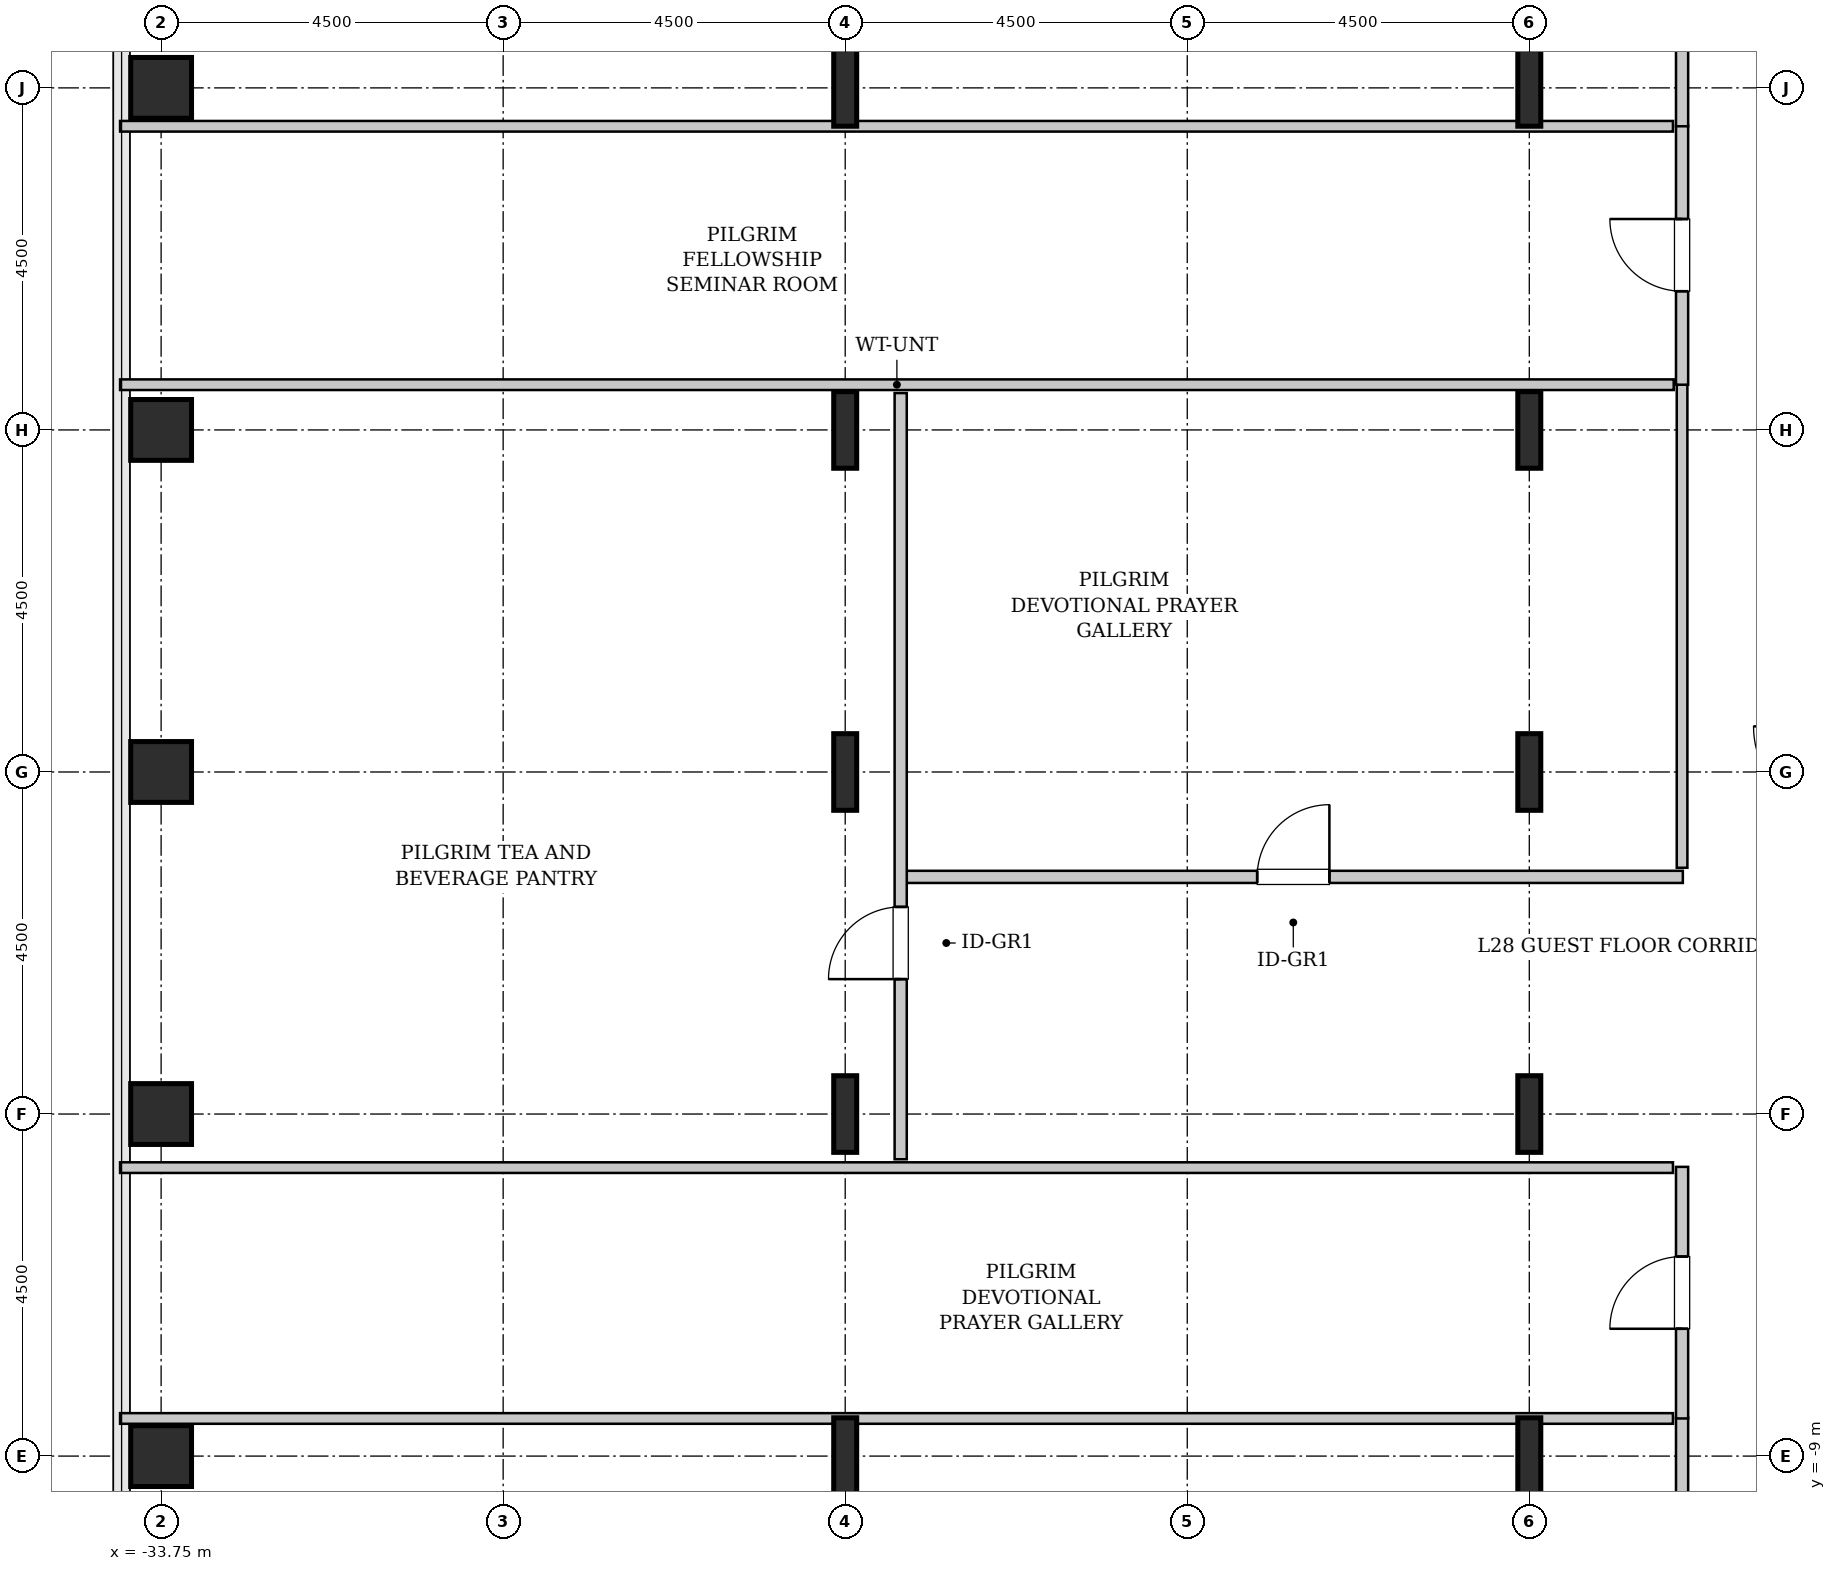
"""IFC4 building model, lengths in metres.
Left out: names, types, materials, properties, quantities, classifications, styles, units other than length and angle.
Written with IfcOpenShell. Run it as: python <this file> out.ifc"""

import sys

from ifc_helpers import new_model, si_unit, direction, frame, frame_2d, origin, origin_2d, place, context, subcontext, project, spatial, rectangle, hollow_rectangle, i_section, extrude, source, transform, mapped, element, fill, save


model = new_model("IFC4")
c1 = context("Model", 3, precision=1e-05, world=origin(), true_north=direction((0.0, 1.0)))
c2 = subcontext(c1, "Body", "Model", "MODEL_VIEW")
j1 = project(units=[si_unit("LENGTHUNIT", "METRE"), si_unit("PLANEANGLEUNIT", "RADIAN")], contexts=[c1])
p1 = place(None, origin())
s1 = spatial("IfcSite", under=j1, at=p1, CompositionType="ELEMENT")
p2 = place(p1, origin())
s2 = spatial("IfcBuilding", under=s1, at=p2, CompositionType="ELEMENT")
p3 = place(p2, frame((0.0, 0.0, 117.4)))
s3 = spatial("IfcBuildingStorey", under=s2, at=p3, CompositionType="ELEMENT", Elevation=117.4)
m1 = source(origin(), c2, "Body", "SweptSolid", [
    extrude(hollow_rectangle(XDim=0.8, YDim=0.8, WallThickness=0.04, InnerFilletRadius=0.04, OuterFilletRadius=0.08, at=origin_2d()), origin(), (0.0, 0.0, 1.0), 3.8),
])
for number, where, z_axis, x_axis in (
    (1, (-33.75, -9.0, 0.0), (0.0, 0.0, 1.0), (1.0, 0.0, 0.0)),
    (2, (-33.75, -4.5, 0.0), (0.0, 0.0, 1.0), (1.0, 0.0, 0.0)),
    (3, (-33.75, 0.0, 0.0), (0.0, 0.0, 1.0), (1.0, 0.0, 0.0)),
    (4, (-33.75, 4.5, 0.0), (0.0, 0.0, 1.0), (1.0, 0.0, 0.0)),
    (5, (-33.75, 9.0, 0.0), (0.0, 0.0, 1.0), (1.0, 0.0, 0.0)),
):
    element("IfcColumn", number, at=place(p3, frame(where, z_axis=z_axis, x_axis=x_axis)), inside=s3, PredefinedType="COLUMN", context=c2, shape_type="MappedRepresentation", body=[
        mapped(m1, transform((0.0, 0.0, 0.0), x_axis=(1.0, 0.0, 0.0), y_axis=(0.0, 1.0, 0.0), z_axis=(0.0, 0.0, 1.0), scale=1.0)),
    ])
m2 = source(origin(), c2, "Body", "SweptSolid", [
    extrude(i_section(OverallWidth=0.302, OverallDepth=1.008, WebThickness=0.021, FlangeThickness=0.04, FilletRadius=0.03, at=origin_2d()), origin(), (0.0, 0.0, 1.0), 3.8),
])
for number, where, z_axis, x_axis in (
    (6, (-24.75, -9.0, 0.0), (0.0, 0.0, 1.0), (1.0, 0.0, 0.0)),
    (7, (-24.75, -4.5, 0.0), (0.0, 0.0, 1.0), (1.0, 0.0, 0.0)),
    (8, (-24.75, 0.0, 0.0), (0.0, 0.0, 1.0), (1.0, 0.0, 0.0)),
    (9, (-24.75, 4.5, 0.0), (0.0, 0.0, 1.0), (1.0, 0.0, 0.0)),
    (10, (-24.75, 9.0, 0.0), (0.0, 0.0, 1.0), (1.0, 0.0, 0.0)),
    (11, (-15.75, -9.0, 0.0), (0.0, 0.0, 1.0), (1.0, 0.0, 0.0)),
    (12, (-15.75, -4.5, 0.0), (0.0, 0.0, 1.0), (1.0, 0.0, 0.0)),
    (13, (-15.75, 0.0, 0.0), (0.0, 0.0, 1.0), (1.0, 0.0, 0.0)),
    (14, (-15.75, 4.5, 0.0), (0.0, 0.0, 1.0), (1.0, 0.0, 0.0)),
    (15, (-15.75, 9.0, 0.0), (0.0, 0.0, 1.0), (1.0, 0.0, 0.0)),
):
    element("IfcColumn", number, at=place(p3, frame(where, z_axis=z_axis, x_axis=x_axis)), inside=s3, PredefinedType="COLUMN", context=c2, shape_type="MappedRepresentation", body=[
        mapped(m2, transform((0.0, 0.0, 0.0), x_axis=(1.0, 0.0, 0.0), y_axis=(0.0, 1.0, 0.0), z_axis=(0.0, 0.0, 1.0), scale=1.0)),
    ])
m3 = source(origin(), c2, "Body", "SweptSolid", [
    extrude(rectangle(XDim=12.745, YDim=0.16, at=frame_2d((6.373, 0.0))), origin(), (0.0, 0.0, 1.0), 3.535),
])
p4 = place(p3, frame((-13.74, -21.24, 0.0), z_axis=(0.0, 0.0, 1.0), x_axis=(0.0, 1.0, 0.0)))
e16 = element("IfcWall", 16, at=p4, inside=s3, PredefinedType="PARTITIONING", context=c2, shape_type="MappedRepresentation", body=[
    mapped(m3, transform((0.0, 0.0, 0.0), x_axis=(1.0, 0.0, 0.0), y_axis=(0.0, 1.0, 0.0), z_axis=(0.0, 0.0, 1.0), scale=1.0)),
])
p5 = place(p4, frame((10.762, 0.0, 0.0)))
e17 = element("IfcOpeningElement", 17, at=p5, cuts=e16, PredefinedType="OPENING", context=c2, shape_type="SweptSolid", body=[
    extrude(rectangle(XDim=0.95, YDim=2.1, at=frame_2d((0.475, 1.05))), frame((0.0, 0.09, 0.0), z_axis=(0.0, -1.0, 0.0), x_axis=(1.0, 0.0, 0.0)), (0.0, 0.0, 1.0), 0.18),
])
m4 = source(origin(), c2, "Body", "SweptSolid", [
    extrude(rectangle(XDim=20.43, YDim=0.14, at=frame_2d((10.215, 0.0))), origin(), (0.0, 0.0, 1.0), 2.875),
])
p6 = place(p3, frame((-34.29, -8.505, 0.0), z_axis=(0.0, 0.0, 1.0), x_axis=(1.0, 0.0, 0.0)))
e18 = element("IfcWall", 18, at=p6, inside=s3, PredefinedType="PARTITIONING", context=c2, shape_type="MappedRepresentation", body=[
    mapped(m4, transform((0.0, 0.0, 0.0), x_axis=(1.0, 0.0, 0.0), y_axis=(0.0, 1.0, 0.0), z_axis=(0.0, 0.0, 1.0), scale=1.0)),
])
m5 = source(origin(), c2, "Body", "SweptSolid", [
    extrude(rectangle(XDim=3.31, YDim=0.16, at=frame_2d((1.655, 0.0))), origin(), (0.0, 0.0, 1.0), 3.535),
])
p7 = place(p3, frame((-13.74, -8.505, 0.0), z_axis=(0.0, 0.0, 1.0), x_axis=(0.0, 1.0, 0.0)))
e19 = element("IfcWall", 19, at=p7, inside=s3, PredefinedType="PARTITIONING", context=c2, shape_type="MappedRepresentation", body=[
    mapped(m5, transform((0.0, 0.0, 0.0), x_axis=(1.0, 0.0, 0.0), y_axis=(0.0, 1.0, 0.0), z_axis=(0.0, 0.0, 1.0), scale=1.0)),
])
p8 = place(p7, frame((1.18, 0.0, 0.0)))
e20 = element("IfcOpeningElement", 20, at=p8, cuts=e19, PredefinedType="OPENING", context=c2, shape_type="SweptSolid", body=[
    extrude(rectangle(XDim=0.95, YDim=2.1, at=frame_2d((0.475, 1.05))), frame((0.0, 0.09, 0.0), z_axis=(0.0, -1.0, 0.0), x_axis=(1.0, 0.0, 0.0)), (0.0, 0.0, 1.0), 0.18),
])
m6 = source(origin(), c2, "Body", "SweptSolid", [
    extrude(rectangle(XDim=20.43, YDim=0.14, at=frame_2d((10.215, 0.0))), origin(), (0.0, 0.0, 1.0), 3.535),
])
p9 = place(p3, frame((-34.29, -5.205, 0.0), z_axis=(0.0, 0.0, 1.0), x_axis=(1.0, 0.0, 0.0)))
e21 = element("IfcWall", 21, at=p9, inside=s3, PredefinedType="PARTITIONING", context=c2, shape_type="MappedRepresentation", body=[
    mapped(m6, transform((0.0, 0.0, 0.0), x_axis=(1.0, 0.0, 0.0), y_axis=(0.0, 1.0, 0.0), z_axis=(0.0, 0.0, 1.0), scale=1.0)),
])
m7 = source(origin(), c2, "Body", "SweptSolid", [
    extrude(rectangle(XDim=10.25, YDim=0.16, at=frame_2d((5.125, 0.0))), origin(), (0.0, 0.0, 1.0), 3.535),
])
p10 = place(p3, frame((-23.98, -1.38, 0.0), z_axis=(0.0, 0.0, 1.0), x_axis=(1.0, 0.0, 0.0)))
e22 = element("IfcWall", 22, at=p10, inside=s3, PredefinedType="PARTITIONING", context=c2, shape_type="MappedRepresentation", body=[
    mapped(m7, transform((0.0, 0.0, 0.0), x_axis=(1.0, 0.0, 0.0), y_axis=(0.0, 1.0, 0.0), z_axis=(0.0, 0.0, 1.0), scale=1.0)),
])
p11 = place(p10, frame((4.65, 0.0, 0.0)))
e23 = element("IfcOpeningElement", 23, at=p11, cuts=e22, PredefinedType="OPENING", context=c2, shape_type="SweptSolid", body=[
    extrude(rectangle(XDim=0.95, YDim=2.1, at=frame_2d((0.475, 1.05))), frame((0.0, 0.09, 0.0), z_axis=(0.0, -1.0, 0.0), x_axis=(1.0, 0.0, 0.0)), (0.0, 0.0, 1.0), 0.18),
])
m8 = source(origin(), c2, "Body", "SweptSolid", [
    extrude(rectangle(XDim=6.365, YDim=0.14, at=frame_2d((3.183, 0.0))), origin(), (0.0, 0.0, 1.0), 3.535),
])
p12 = place(p3, frame((-13.74, -1.26, 0.0), z_axis=(0.0, 0.0, 1.0), x_axis=(0.0, 1.0, 0.0)))
e24 = element("IfcWall", 24, at=p12, inside=s3, PredefinedType="PARTITIONING", context=c2, shape_type="MappedRepresentation", body=[
    mapped(m8, transform((0.0, 0.0, 0.0), x_axis=(1.0, 0.0, 0.0), y_axis=(0.0, 1.0, 0.0), z_axis=(0.0, 0.0, 1.0), scale=1.0)),
])
m9 = source(origin(), c2, "Body", "SweptSolid", [
    extrude(rectangle(XDim=20.44, YDim=0.14, at=frame_2d((10.22, 0.0))), origin(), (0.0, 0.0, 1.0), 3.535),
])
p13 = place(p3, frame((-34.29, 5.095, 0.0), z_axis=(0.0, 0.0, 1.0), x_axis=(1.0, 0.0, 0.0)))
e25 = element("IfcWall", 25, at=p13, inside=s3, PredefinedType="PARTITIONING", context=c2, shape_type="MappedRepresentation", body=[
    mapped(m9, transform((0.0, 0.0, 0.0), x_axis=(1.0, 0.0, 0.0), y_axis=(0.0, 1.0, 0.0), z_axis=(0.0, 0.0, 1.0), scale=1.0)),
])
m10 = source(origin(), c2, "Body", "SweptSolid", [
    extrude(rectangle(XDim=10.08, YDim=0.16, at=frame_2d((5.04, 0.0))), origin(), (0.0, 0.0, 1.0), 3.535),
])
p14 = place(p3, frame((-24.02, -5.095, 0.0), z_axis=(0.0, 0.0, 1.0), x_axis=(0.0, 1.0, 0.0)))
e26 = element("IfcWall", 26, at=p14, inside=s3, PredefinedType="PARTITIONING", context=c2, shape_type="MappedRepresentation", body=[
    mapped(m10, transform((0.0, 0.0, 0.0), x_axis=(1.0, 0.0, 0.0), y_axis=(0.0, 1.0, 0.0), z_axis=(0.0, 0.0, 1.0), scale=1.0)),
])
p15 = place(p14, frame((2.37, 0.0, 0.0)))
e27 = element("IfcOpeningElement", 27, at=p15, cuts=e26, PredefinedType="OPENING", context=c2, shape_type="SweptSolid", body=[
    extrude(rectangle(XDim=0.95, YDim=2.1, at=frame_2d((0.475, 1.05))), frame((0.0, 0.09, 0.0), z_axis=(0.0, -1.0, 0.0), x_axis=(1.0, 0.0, 0.0)), (0.0, 0.0, 1.0), 0.18),
])
m11 = source(origin(), c2, "Body", "SweptSolid", [
    extrude(rectangle(XDim=3.41, YDim=0.16, at=frame_2d((1.705, 0.0))), origin(), (0.0, 0.0, 1.0), 3.535),
])
p16 = place(p3, frame((-13.74, 5.095, 0.0), z_axis=(0.0, 0.0, 1.0), x_axis=(0.0, 1.0, 0.0)))
e28 = element("IfcWall", 28, at=p16, inside=s3, PredefinedType="PARTITIONING", context=c2, shape_type="MappedRepresentation", body=[
    mapped(m11, transform((0.0, 0.0, 0.0), x_axis=(1.0, 0.0, 0.0), y_axis=(0.0, 1.0, 0.0), z_axis=(0.0, 0.0, 1.0), scale=1.0)),
])
p17 = place(p16, frame((1.23, 0.0, 0.0)))
e29 = element("IfcOpeningElement", 29, at=p17, cuts=e28, PredefinedType="OPENING", context=c2, shape_type="SweptSolid", body=[
    extrude(rectangle(XDim=0.95, YDim=2.1, at=frame_2d((0.475, 1.05))), frame((0.0, 0.09, 0.0), z_axis=(0.0, -1.0, 0.0), x_axis=(1.0, 0.0, 0.0)), (0.0, 0.0, 1.0), 0.18),
])
p18 = place(p3, frame((-34.29, 8.495, 0.0), z_axis=(0.0, 0.0, 1.0), x_axis=(1.0, 0.0, 0.0)))
e30 = element("IfcWall", 30, at=p18, inside=s3, PredefinedType="PARTITIONING", context=c2, shape_type="MappedRepresentation", body=[
    mapped(m4, transform((0.0, 0.0, 0.0), x_axis=(1.0, 0.0, 0.0), y_axis=(0.0, 1.0, 0.0), z_axis=(0.0, 0.0, 1.0), scale=1.0)),
])
p19 = place(p3, frame((-13.74, 8.495, 0.0), z_axis=(0.0, 0.0, 1.0), x_axis=(0.0, 1.0, 0.0)))
e31 = element("IfcWall", 31, at=p19, inside=s3, PredefinedType="PARTITIONING", context=c2, shape_type="MappedRepresentation", body=[
    mapped(m3, transform((0.0, 0.0, 0.0), x_axis=(1.0, 0.0, 0.0), y_axis=(0.0, 1.0, 0.0), z_axis=(0.0, 0.0, 1.0), scale=1.0)),
])
p20 = place(p19, frame((1.032, 0.0, 0.0)))
e32 = element("IfcOpeningElement", 32, at=p20, cuts=e31, PredefinedType="OPENING", context=c2, shape_type="SweptSolid", body=[
    extrude(rectangle(XDim=0.95, YDim=2.1, at=frame_2d((0.475, 1.05))), frame((0.0, 0.09, 0.0), z_axis=(0.0, -1.0, 0.0), x_axis=(1.0, 0.0, 0.0)), (0.0, 0.0, 1.0), 0.18),
])
m12 = source(origin(), c2, "Body", "SweptSolid", [
    extrude(rectangle(XDim=0.95, YDim=2.1, at=frame_2d((0.475, 1.05))), frame((0.0, 0.025, 0.0), z_axis=(0.0, -1.0, 0.0), x_axis=(1.0, 0.0, 0.0)), (0.0, 0.0, 1.0), 0.05),
])
p21 = place(p8, origin())
e33 = element("IfcDoor", 33, at=p21, inside=s3, OperationType="SINGLE_SWING_LEFT", PredefinedType="DOOR", context=c2, shape_type="MappedRepresentation", body=[
    mapped(m12, transform((0.0, 0.0, 0.0), x_axis=(1.0, 0.0, 0.0), y_axis=(0.0, 1.0, 0.0), z_axis=(0.0, 0.0, 1.0), scale=1.0)),
])
fill(e20, e33)
p22 = place(p11, origin())
e34 = element("IfcDoor", 34, at=p22, inside=s3, OperationType="SINGLE_SWING_RIGHT", PredefinedType="DOOR", context=c2, shape_type="MappedRepresentation", body=[
    mapped(m12, transform((0.0, 0.0, 0.0), x_axis=(1.0, 0.0, 0.0), y_axis=(0.0, 1.0, 0.0), z_axis=(0.0, 0.0, 1.0), scale=1.0)),
])
fill(e23, e34)
p23 = place(p15, origin())
e35 = element("IfcDoor", 35, at=p23, inside=s3, OperationType="SINGLE_SWING_LEFT", PredefinedType="DOOR", context=c2, shape_type="MappedRepresentation", body=[
    mapped(m12, transform((0.0, 0.0, 0.0), x_axis=(1.0, 0.0, 0.0), y_axis=(0.0, 1.0, 0.0), z_axis=(0.0, 0.0, 1.0), scale=1.0)),
])
fill(e27, e35)
p24 = place(p17, origin())
e36 = element("IfcDoor", 36, at=p24, inside=s3, OperationType="SINGLE_SWING_RIGHT", PredefinedType="DOOR", context=c2, shape_type="MappedRepresentation", body=[
    mapped(m12, transform((0.0, 0.0, 0.0), x_axis=(1.0, 0.0, 0.0), y_axis=(0.0, 1.0, 0.0), z_axis=(0.0, 0.0, 1.0), scale=1.0)),
])
fill(e29, e36)
save(model, sys.argv[1])
